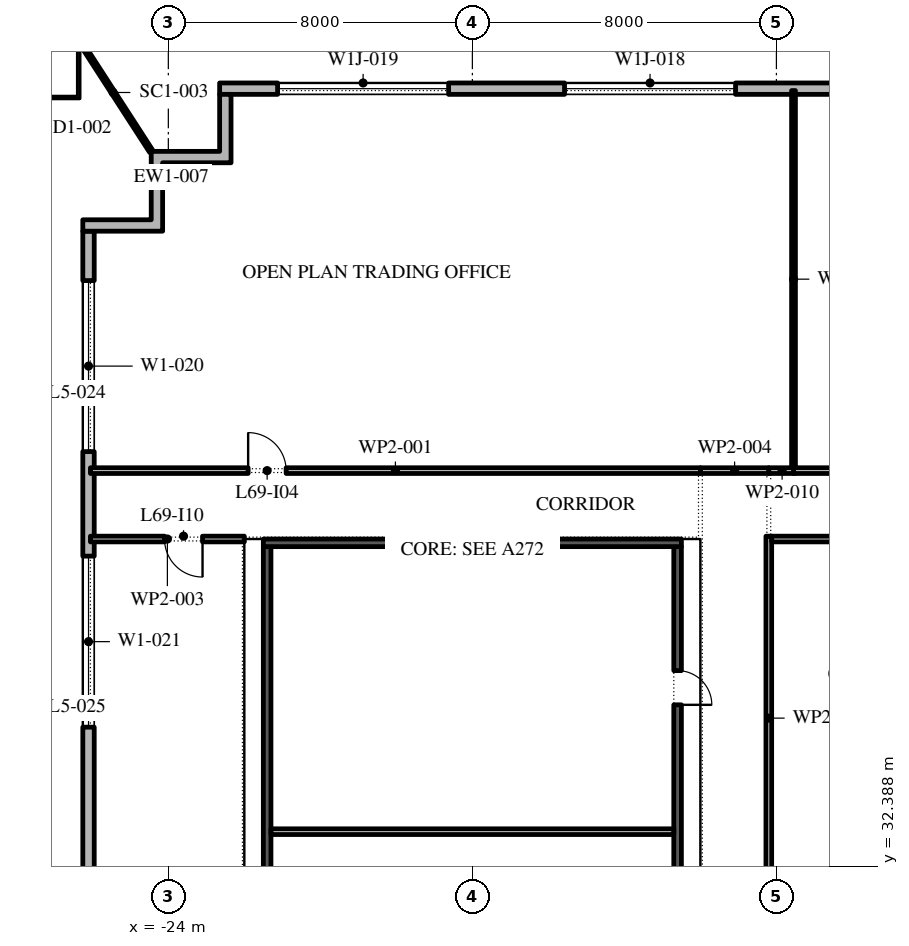
"""IFC4 building model, lengths in metres.
Left out: names, types, materials, properties, quantities, classifications, styles, units other than length and angle.
Written with IfcOpenShell. Run it as: python <this file> out.ifc"""

import sys

from ifc_helpers import new_model, si_unit, direction, frame, frame_2d, origin, place, context, subcontext, project, spatial, polyline, rectangle, outline, extrude, element, fill, save


model = new_model("IFC4")
c1 = context("Model", 3, precision=1e-05, world=origin(), true_north=direction((0.0, 1.0)))
c2 = subcontext(c1, "Body", "Model", "MODEL_VIEW")
j1 = project(units=[si_unit("LENGTHUNIT", "METRE"), si_unit("PLANEANGLEUNIT", "RADIAN")], contexts=[c1])
p1 = place(None, origin())
s1 = spatial("IfcSite", under=j1, at=p1, CompositionType="ELEMENT")
p2 = place(p1, origin())
s2 = spatial("IfcBuilding", under=s1, at=p2, CompositionType="ELEMENT")
p3 = place(p2, frame((0.0, 0.0, 317.4)))
s3 = spatial("IfcBuildingStorey", under=s2, at=p3, CompositionType="ELEMENT", Elevation=317.4)
p4 = place(p3, frame((22.35, 52.85, 0.0), z_axis=(0.0, 0.0, 1.0), x_axis=(-1.0, 0.0, 0.0)))
e1 = element("IfcWall", 1, at=p4, inside=s3, PredefinedType="STANDARD", context=c2, shape_type="SweptSolid", body=[
    extrude(rectangle(XDim=45.0, YDim=0.3, at=frame_2d((22.5, 0.0))), origin(), (0.0, 0.0, 1.0), 4.0),
])
p5 = place(p4, frame((1.375, 0.0, 0.45)))
e2 = element("IfcOpeningElement", 2, at=p5, cuts=e1, PredefinedType="OPENING", context=c2, shape_type="SweptSolid", body=[
    extrude(rectangle(XDim=4.5, YDim=2.675, at=frame_2d((2.25, 1.337))), frame((0.0, 0.16, 0.0), z_axis=(0.0, -1.0, 0.0), x_axis=(1.0, 0.0, 0.0)), (0.0, 0.0, 1.0), 0.32),
])
p6 = place(p4, frame((8.775, 0.0, 0.45)))
e3 = element("IfcOpeningElement", 3, at=p6, cuts=e1, PredefinedType="OPENING", context=c2, shape_type="SweptSolid", body=[
    extrude(rectangle(XDim=4.5, YDim=2.675, at=frame_2d((2.25, 1.337))), frame((0.0, 0.16, 0.0), z_axis=(0.0, -1.0, 0.0), x_axis=(1.0, 0.0, 0.0)), (0.0, 0.0, 1.0), 0.32),
])
p7 = place(p4, frame((17.375, 0.0, 0.0)))
e4 = element("IfcOpeningElement", 4, at=p7, cuts=e1, PredefinedType="OPENING", context=c2, shape_type="SweptSolid", body=[
    extrude(rectangle(XDim=2.4, YDim=3.125, at=frame_2d((1.2, 1.562))), frame((0.0, 0.16, 0.0), z_axis=(0.0, -1.0, 0.0), x_axis=(1.0, 0.0, 0.0)), (0.0, 0.0, 1.0), 0.32),
])
p8 = place(p4, frame((23.875, 0.0, 0.45)))
e5 = element("IfcOpeningElement", 5, at=p8, cuts=e1, PredefinedType="OPENING", context=c2, shape_type="SweptSolid", body=[
    extrude(rectangle(XDim=4.5, YDim=2.675, at=frame_2d((2.25, 1.337))), frame((0.0, 0.16, 0.0), z_axis=(0.0, -1.0, 0.0), x_axis=(1.0, 0.0, 0.0)), (0.0, 0.0, 1.0), 0.32),
])
p9 = place(p4, frame((31.425, 0.0, 0.45)))
e6 = element("IfcOpeningElement", 6, at=p9, cuts=e1, PredefinedType="OPENING", context=c2, shape_type="SweptSolid", body=[
    extrude(rectangle(XDim=4.5, YDim=2.675, at=frame_2d((2.25, 1.337))), frame((0.0, 0.16, 0.0), z_axis=(0.0, -1.0, 0.0), x_axis=(1.0, 0.0, 0.0)), (0.0, 0.0, 1.0), 0.32),
])
p10 = place(p4, frame((38.975, 0.0, 0.45)))
e7 = element("IfcOpeningElement", 7, at=p10, cuts=e1, PredefinedType="OPENING", context=c2, shape_type="SweptSolid", body=[
    extrude(rectangle(XDim=4.5, YDim=2.675, at=frame_2d((2.25, 1.337))), frame((0.0, 0.16, 0.0), z_axis=(0.0, -1.0, 0.0), x_axis=(1.0, 0.0, 0.0)), (0.0, 0.0, 1.0), 0.32),
])
p11 = place(p3, frame((-26.1, 49.1, 0.0), z_axis=(0.0, 0.0, 1.0), x_axis=(0.0, -1.0, 0.0)))
e8 = element("IfcWall", 8, at=p11, inside=s3, PredefinedType="STANDARD", context=c2, shape_type="SweptSolid", body=[
    extrude(rectangle(XDim=51.5, YDim=0.3, at=frame_2d((25.75, 0.0))), origin(), (0.0, 0.0, 1.0), 4.0),
])
p12 = place(p11, frame((1.3, 0.0, 0.45)))
e9 = element("IfcOpeningElement", 9, at=p12, cuts=e8, PredefinedType="OPENING", context=c2, shape_type="SweptSolid", body=[
    extrude(rectangle(XDim=4.5, YDim=3.05, at=frame_2d((2.25, 1.525))), frame((0.0, 0.16, 0.0), z_axis=(0.0, -1.0, 0.0), x_axis=(1.0, 0.0, 0.0)), (0.0, 0.0, 1.0), 0.32),
])
p13 = place(p11, frame((8.55, 0.0, 0.45)))
e10 = element("IfcOpeningElement", 10, at=p13, cuts=e8, PredefinedType="OPENING", context=c2, shape_type="SweptSolid", body=[
    extrude(rectangle(XDim=4.5, YDim=3.05, at=frame_2d((2.25, 1.525))), frame((0.0, 0.16, 0.0), z_axis=(0.0, -1.0, 0.0), x_axis=(1.0, 0.0, 0.0)), (0.0, 0.0, 1.0), 0.32),
])
p14 = place(p11, frame((17.0, 0.0, 0.0)))
e11 = element("IfcOpeningElement", 11, at=p14, cuts=e8, PredefinedType="OPENING", context=c2, shape_type="SweptSolid", body=[
    extrude(rectangle(XDim=2.4, YDim=3.5, at=frame_2d((1.2, 1.75))), frame((0.0, 0.16, 0.0), z_axis=(0.0, -1.0, 0.0), x_axis=(1.0, 0.0, 0.0)), (0.0, 0.0, 1.0), 0.32),
])
p15 = place(p11, frame((23.35, 0.0, 0.45)))
e12 = element("IfcOpeningElement", 12, at=p15, cuts=e8, PredefinedType="OPENING", context=c2, shape_type="SweptSolid", body=[
    extrude(rectangle(XDim=4.5, YDim=3.05, at=frame_2d((2.25, 1.525))), frame((0.0, 0.16, 0.0), z_axis=(0.0, -1.0, 0.0), x_axis=(1.0, 0.0, 0.0)), (0.0, 0.0, 1.0), 0.32),
])
p16 = place(p11, frame((30.75, 0.0, 0.45)))
e13 = element("IfcOpeningElement", 13, at=p16, cuts=e8, PredefinedType="OPENING", context=c2, shape_type="SweptSolid", body=[
    extrude(rectangle(XDim=4.5, YDim=3.05, at=frame_2d((2.25, 1.525))), frame((0.0, 0.16, 0.0), z_axis=(0.0, -1.0, 0.0), x_axis=(1.0, 0.0, 0.0)), (0.0, 0.0, 1.0), 0.32),
])
p17 = place(p11, frame((38.15, 0.0, 0.45)))
e14 = element("IfcOpeningElement", 14, at=p17, cuts=e8, PredefinedType="OPENING", context=c2, shape_type="SweptSolid", body=[
    extrude(rectangle(XDim=4.5, YDim=3.05, at=frame_2d((2.25, 1.525))), frame((0.0, 0.16, 0.0), z_axis=(0.0, -1.0, 0.0), x_axis=(1.0, 0.0, 0.0)), (0.0, 0.0, 1.0), 0.32),
])
p18 = place(p11, frame((46.6, 0.0, 0.0)))
e15 = element("IfcOpeningElement", 15, at=p18, cuts=e8, PredefinedType="OPENING", context=c2, shape_type="SweptSolid", body=[
    extrude(rectangle(XDim=2.4, YDim=3.5, at=frame_2d((1.2, 1.75))), frame((0.0, 0.16, 0.0), z_axis=(0.0, -1.0, 0.0), x_axis=(1.0, 0.0, 0.0)), (0.0, 0.0, 1.0), 0.32),
])
p19 = place(p3, origin())
e16 = element("IfcWall", 16, at=p19, inside=s3, PredefinedType="STANDARD", context=c2, shape_type="SweptSolid", body=[
    extrude(outline(polyline([(-24.45, 49.4), (-24.45, 51.2), (-22.65, 51.2), (-22.65, 52.7), (-22.35, 52.7), (-22.35, 50.9), (-24.15, 50.9), (-24.15, 49.1), (-26.25, 49.1), (-26.25, 49.4), (-24.45, 49.4)])), origin(), (0.0, 0.0, 1.0), 4.0),
])
p20 = place(p3, frame((-24.45, 51.2, -0.05), z_axis=(0.0, 0.0, 1.0), x_axis=(-0.543275962531, 0.839554184396, 0.0)))
e17 = element("IfcWall", 17, at=p20, inside=s3, PredefinedType="STANDARD", context=c2, shape_type="SweptSolid", body=[
    extrude(rectangle(XDim=3.691, YDim=0.1, at=frame_2d((1.845, 0.0))), origin(), (0.0, 0.0, 1.0), 4.05),
])
p21 = place(p3, frame((-21.4, 25.75, 0.0), z_axis=(0.0, 0.0, 1.0), x_axis=(0.0, 1.0, 0.0)))
e18 = element("IfcWall", 18, at=p21, inside=s3, PredefinedType="SHEAR", context=c2, shape_type="SweptSolid", body=[
    extrude(rectangle(XDim=15.05, YDim=0.2, at=frame_2d((7.525, 0.0))), origin(), (0.0, 0.0, 1.0), 4.0),
])
p22 = place(p3, frame((-10.6, 25.75, 0.0), z_axis=(0.0, 0.0, 1.0), x_axis=(0.0, 1.0, 0.0)))
e19 = element("IfcWall", 19, at=p22, inside=s3, PredefinedType="SHEAR", context=c2, shape_type="SweptSolid", body=[
    extrude(rectangle(XDim=15.05, YDim=0.2, at=frame_2d((7.525, 0.0))), origin(), (0.0, 0.0, 1.0), 4.0),
])
p23 = place(p22, frame((3.288, 0.0, 0.0)))
e20 = element("IfcOpeningElement", 20, at=p23, cuts=e19, PredefinedType="OPENING", context=c2, shape_type="SweptSolid", body=[
    extrude(rectangle(XDim=0.9, YDim=2.1, at=frame_2d((0.45, 1.05))), frame((0.0, 0.11, 0.0), z_axis=(0.0, -1.0, 0.0), x_axis=(1.0, 0.0, 0.0)), (0.0, 0.0, 1.0), 0.22),
])
p24 = place(p22, frame((10.887, 0.0, 0.0)))
e21 = element("IfcOpeningElement", 21, at=p24, cuts=e19, PredefinedType="OPENING", context=c2, shape_type="SweptSolid", body=[
    extrude(rectangle(XDim=0.9, YDim=2.1, at=frame_2d((0.45, 1.05))), frame((0.0, 0.11, 0.0), z_axis=(0.0, -1.0, 0.0), x_axis=(1.0, 0.0, 0.0)), (0.0, 0.0, 1.0), 0.22),
])
p25 = place(p3, frame((-21.5, 40.9, 0.0), z_axis=(0.0, 0.0, 1.0), x_axis=(1.0, 0.0, 0.0)))
e22 = element("IfcWall", 22, at=p25, inside=s3, PredefinedType="SHEAR", context=c2, shape_type="SweptSolid", body=[
    extrude(rectangle(XDim=11.0, YDim=0.2, at=frame_2d((5.5, 0.0))), origin(), (0.0, 0.0, 1.0), 4.0),
])
p26 = place(p3, frame((-21.3, 33.3, 0.0), z_axis=(0.0, 0.0, 1.0), x_axis=(1.0, 0.0, 0.0)))
e23 = element("IfcWall", 23, at=p26, inside=s3, PredefinedType="PARTITIONING", context=c2, shape_type="SweptSolid", body=[
    extrude(rectangle(XDim=10.6, YDim=0.15, at=frame_2d((5.3, 0.0))), origin(), (0.0, 0.0, 1.0), 4.0),
])
p27 = place(p3, frame((-26.05, 42.8, 0.0), z_axis=(0.0, 0.0, 1.0), x_axis=(1.0, 0.0, 0.0)))
e24 = element("IfcWall", 24, at=p27, inside=s3, PredefinedType="PARTITIONING", context=c2, shape_type="SweptSolid", body=[
    extrude(rectangle(XDim=16.05, YDim=0.15, at=frame_2d((8.025, 0.0))), origin(), (0.0, 0.0, 1.0), 4.0),
])
p28 = place(p27, frame((4.15, 0.0, 0.0)))
e25 = element("IfcOpeningElement", 25, at=p28, cuts=e24, PredefinedType="OPENING", context=c2, shape_type="SweptSolid", body=[
    extrude(rectangle(XDim=1.0, YDim=2.1, at=frame_2d((0.5, 1.05))), frame((0.0, 0.085, 0.0), z_axis=(0.0, -1.0, 0.0), x_axis=(1.0, 0.0, 0.0)), (0.0, 0.0, 1.0), 0.17),
])
p29 = place(p3, frame((-22.0, 41.0, 0.0), z_axis=(0.0, 0.0, 1.0), x_axis=(-1.0, 0.0, 0.0)))
e26 = element("IfcWall", 26, at=p29, inside=s3, PredefinedType="PARTITIONING", context=c2, shape_type="SweptSolid", body=[
    extrude(rectangle(XDim=4.05, YDim=0.15, at=frame_2d((2.025, 0.0))), origin(), (0.0, 0.0, 1.0), 4.0),
])
p30 = place(p29, frame((1.1, 0.0, 0.0)))
e27 = element("IfcOpeningElement", 27, at=p30, cuts=e26, PredefinedType="OPENING", context=c2, shape_type="SweptSolid", body=[
    extrude(rectangle(XDim=1.0, YDim=2.1, at=frame_2d((0.5, 1.05))), frame((0.0, 0.085, 0.0), z_axis=(0.0, -1.0, 0.0), x_axis=(1.0, 0.0, 0.0)), (0.0, 0.0, 1.0), 0.17),
])
p31 = place(p3, frame((-10.0, 42.8, 0.0), z_axis=(0.0, 0.0, 1.0), x_axis=(1.0, 0.0, 0.0)))
e28 = element("IfcWall", 28, at=p31, inside=s3, PredefinedType="PARTITIONING", context=c2, shape_type="SweptSolid", body=[
    extrude(rectangle(XDim=1.8, YDim=0.15, at=frame_2d((0.9, 0.0))), origin(), (0.0, 0.0, 1.0), 4.0),
])
p32 = place(p3, frame((-8.2, 41.075, 0.0), z_axis=(0.0, 0.0, 1.0), x_axis=(0.0, -1.0, 0.0)))
e29 = element("IfcWall", 29, at=p32, inside=s3, PredefinedType="PARTITIONING", context=c2, shape_type="SweptSolid", body=[
    extrude(rectangle(XDim=9.575, YDim=0.15, at=frame_2d((4.788, 0.0))), origin(), (0.0, 0.0, 1.0), 4.0),
])
p33 = place(p3, frame((-8.2, 42.8, 0.0), z_axis=(0.0, 0.0, 1.0), x_axis=(1.0, 0.0, 0.0)))
e30 = element("IfcWall", 30, at=p33, inside=s3, PredefinedType="PARTITIONING", context=c2, shape_type="SweptSolid", body=[
    extrude(rectangle(XDim=0.7, YDim=0.15, at=frame_2d((0.35, 0.0))), origin(), (0.0, 0.0, 1.0), 4.0),
])
p34 = place(p3, frame((-7.55, 42.875, 0.0), z_axis=(0.0, 0.0, 1.0), x_axis=(0.0, 1.0, 0.0)))
e31 = element("IfcWall", 31, at=p34, inside=s3, PredefinedType="PARTITIONING", context=c2, shape_type="SweptSolid", body=[
    extrude(rectangle(XDim=9.925, YDim=0.1, at=frame_2d((4.962, 0.0))), origin(), (0.0, 0.0, 1.0), 4.0),
])
p35 = place(p3, frame((-7.55, 42.8, 0.0), z_axis=(0.0, 0.0, 1.0), x_axis=(1.0, 0.0, 0.0)))
e32 = element("IfcWall", 32, at=p35, inside=s3, PredefinedType="PARTITIONING", context=c2, shape_type="SweptSolid", body=[
    extrude(rectangle(XDim=15.15, YDim=0.15, at=frame_2d((7.575, 0.0))), origin(), (0.0, 0.0, 1.0), 4.0),
])
p36 = place(p35, frame((3.95, 0.0, 0.0)))
e33 = element("IfcOpeningElement", 33, at=p36, cuts=e32, PredefinedType="OPENING", context=c2, shape_type="SweptSolid", body=[
    extrude(rectangle(XDim=1.0, YDim=2.1, at=frame_2d((0.5, 1.05))), frame((0.0, 0.085, 0.0), z_axis=(0.0, -1.0, 0.0), x_axis=(1.0, 0.0, 0.0)), (0.0, 0.0, 1.0), 0.17),
])
p37 = place(p3, frame((2.45, 41.0, 0.0), z_axis=(0.0, 0.0, 1.0), x_axis=(-1.0, 0.0, 0.0)))
e34 = element("IfcWall", 34, at=p37, inside=s3, PredefinedType="PARTITIONING", context=c2, shape_type="SweptSolid", body=[
    extrude(rectangle(XDim=10.575, YDim=0.15, at=frame_2d((5.288, 0.0))), origin(), (0.0, 0.0, 1.0), 4.0),
])
p38 = place(p37, frame((2.75, 0.0, 0.0)))
e35 = element("IfcOpeningElement", 35, at=p38, cuts=e34, PredefinedType="OPENING", context=c2, shape_type="SweptSolid", body=[
    extrude(rectangle(XDim=1.0, YDim=2.1, at=frame_2d((0.5, 1.05))), frame((0.0, 0.085, 0.0), z_axis=(0.0, -1.0, 0.0), x_axis=(1.0, 0.0, 0.0)), (0.0, 0.0, 1.0), 0.17),
])
p39 = place(p9, origin())
e36 = element("IfcWindow", 36, at=p39, inside=s3, PartitioningType="DOUBLE_PANEL_VERTICAL", PredefinedType="WINDOW", context=c2, shape_type="SweptSolid", body=[
    extrude(rectangle(XDim=4.5, YDim=2.675, at=frame_2d((2.25, 1.337))), frame((0.0, 0.03, 0.0), z_axis=(0.0, -1.0, 0.0), x_axis=(1.0, 0.0, 0.0)), (0.0, 0.0, 1.0), 0.06),
])
fill(e6, e36)
p40 = place(p10, origin())
e37 = element("IfcWindow", 37, at=p40, inside=s3, PartitioningType="DOUBLE_PANEL_VERTICAL", PredefinedType="WINDOW", context=c2, shape_type="SweptSolid", body=[
    extrude(rectangle(XDim=4.5, YDim=2.675, at=frame_2d((2.25, 1.337))), frame((0.0, 0.03, 0.0), z_axis=(0.0, -1.0, 0.0), x_axis=(1.0, 0.0, 0.0)), (0.0, 0.0, 1.0), 0.06),
])
fill(e7, e37)
p41 = place(p12, origin())
e38 = element("IfcWindow", 38, at=p41, inside=s3, PartitioningType="DOUBLE_PANEL_VERTICAL", PredefinedType="WINDOW", context=c2, shape_type="SweptSolid", body=[
    extrude(rectangle(XDim=4.5, YDim=3.05, at=frame_2d((2.25, 1.525))), frame((0.0, 0.03, 0.0), z_axis=(0.0, -1.0, 0.0), x_axis=(1.0, 0.0, 0.0)), (0.0, 0.0, 1.0), 0.06),
])
fill(e9, e38)
p42 = place(p13, origin())
e39 = element("IfcWindow", 39, at=p42, inside=s3, PartitioningType="DOUBLE_PANEL_VERTICAL", PredefinedType="WINDOW", context=c2, shape_type="SweptSolid", body=[
    extrude(rectangle(XDim=4.5, YDim=3.05, at=frame_2d((2.25, 1.525))), frame((0.0, 0.03, 0.0), z_axis=(0.0, -1.0, 0.0), x_axis=(1.0, 0.0, 0.0)), (0.0, 0.0, 1.0), 0.06),
])
fill(e10, e39)
p43 = place(p24, frame((0.9, 0.15, 0.0), z_axis=(0.0, 0.0, 1.0), x_axis=(-1.0, 0.0, 0.0)))
e40 = element("IfcDoor", 40, at=p43, inside=s3, OperationType="SINGLE_SWING_LEFT", PredefinedType="DOOR", context=c2, shape_type="SweptSolid", body=[
    extrude(rectangle(XDim=0.9, YDim=2.1, at=frame_2d((0.45, 1.05))), frame((0.0, 0.1, 0.0), z_axis=(0.0, -1.0, 0.0), x_axis=(1.0, 0.0, 0.0)), (0.0, 0.0, 1.0), 0.05),
])
fill(e21, e40)
p44 = place(p28, origin())
e41 = element("IfcDoor", 41, at=p44, inside=s3, OperationType="SINGLE_SWING_RIGHT", PredefinedType="DOOR", context=c2, shape_type="SweptSolid", body=[
    extrude(rectangle(XDim=1.0, YDim=2.1, at=frame_2d((0.5, 1.05))), frame((0.0, 0.025, 0.0), z_axis=(0.0, -1.0, 0.0), x_axis=(1.0, 0.0, 0.0)), (0.0, 0.0, 1.0), 0.05),
])
fill(e25, e41)
p45 = place(p30, origin())
e42 = element("IfcDoor", 42, at=p45, inside=s3, OperationType="SINGLE_SWING_RIGHT", PredefinedType="DOOR", context=c2, shape_type="SweptSolid", body=[
    extrude(rectangle(XDim=1.0, YDim=2.1, at=frame_2d((0.5, 1.05))), frame((0.0, 0.025, 0.0), z_axis=(0.0, -1.0, 0.0), x_axis=(1.0, 0.0, 0.0)), (0.0, 0.0, 1.0), 0.05),
])
fill(e27, e42)
save(model, sys.argv[1])
